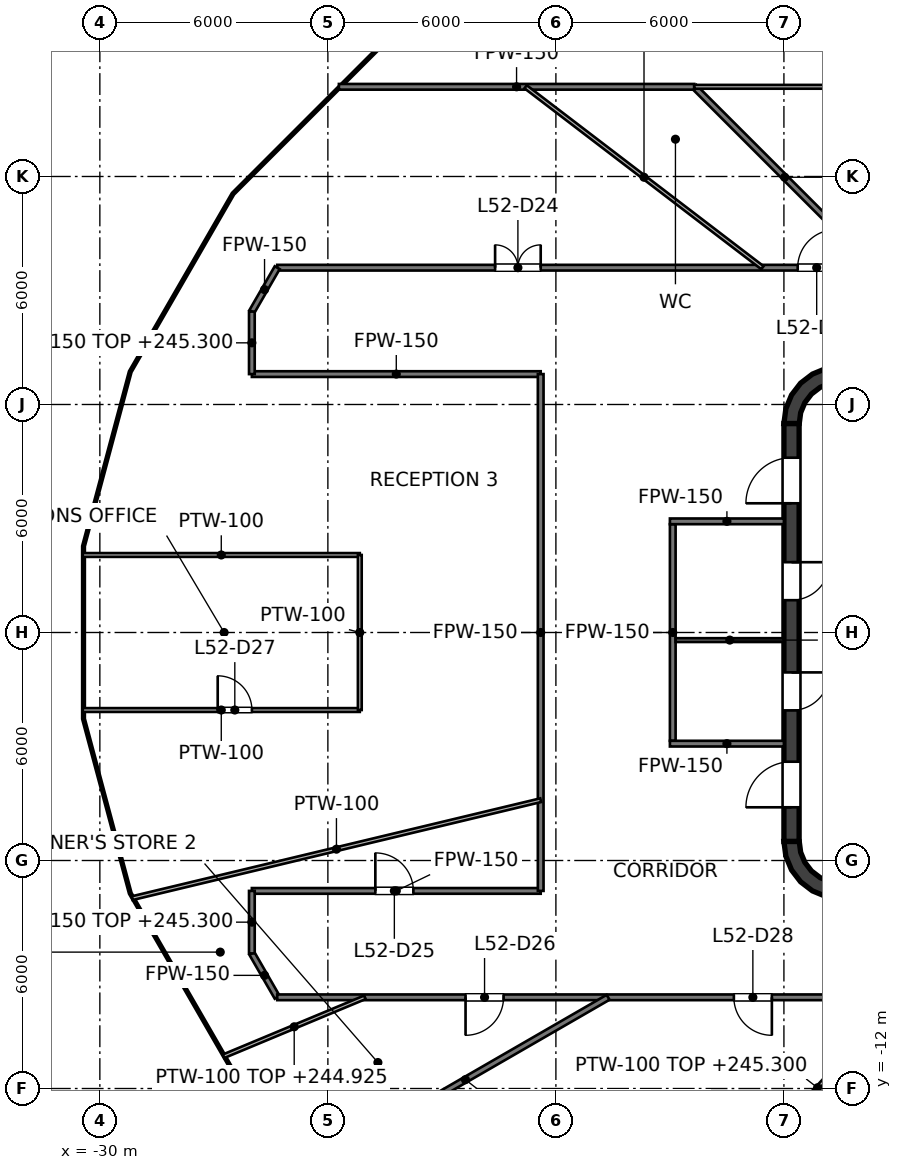
"""IFC4 building model, lengths in metres.
Left out: names, types, materials, properties, quantities, classifications, styles, units other than length and angle.
Written with IfcOpenShell. Run it as: python <this file> out.ifc"""

import sys

from ifc_helpers import new_model, si_unit, direction, frame, frame_2d, origin, place, context, subcontext, project, spatial, polyline, rectangle, outline, extrude, element, fill, save


model = new_model("IFC4")
c1 = context("Model", 3, precision=1e-05, world=origin(), true_north=direction((0.0, 1.0)))
c2 = subcontext(c1, "Body", "Model", "MODEL_VIEW")
j1 = project(units=[si_unit("LENGTHUNIT", "METRE"), si_unit("PLANEANGLEUNIT", "RADIAN")], contexts=[c1])
p1 = place(None, origin())
s1 = spatial("IfcSite", under=j1, at=p1, CompositionType="ELEMENT")
p2 = place(p1, origin())
s2 = spatial("IfcBuilding", under=s1, at=p2, CompositionType="ELEMENT")
p3 = place(p2, frame((0.0, 0.0, 241.6)))
s3 = spatial("IfcBuildingStorey", under=s2, at=p3, CompositionType="ELEMENT", Elevation=241.6)
p4 = place(p3, frame((-11.8, -5.5, 0.0), z_axis=(0.0, 0.0, 1.0), x_axis=(0.0, 1.0, 0.0)))
e1 = element("IfcWall", 1, at=p4, inside=s3, PredefinedType="SHEAR", context=c2, shape_type="SweptSolid", body=[
    extrude(rectangle(XDim=11.0, YDim=0.4, at=frame_2d((5.5, 0.0))), origin(), (0.0, 0.0, 1.0), 4.0),
])
p5 = place(p4, frame((3.45, 0.0, 0.0)))
e2 = element("IfcOpeningElement", 2, at=p5, cuts=e1, PredefinedType="OPENING", context=c2, shape_type="SweptSolid", body=[
    extrude(rectangle(XDim=1.0, YDim=2.1, at=frame_2d((0.5, 1.05))), frame((0.0, 0.2, 0.0), z_axis=(0.0, -1.0, 0.0), x_axis=(1.0, 0.0, 0.0)), (0.0, 0.0, 1.0), 0.4),
])
p6 = place(p4, frame((6.35, 0.0, 0.0)))
e3 = element("IfcOpeningElement", 3, at=p6, cuts=e1, PredefinedType="OPENING", context=c2, shape_type="SweptSolid", body=[
    extrude(rectangle(XDim=1.0, YDim=2.1, at=frame_2d((0.5, 1.05))), frame((0.0, 0.2, 0.0), z_axis=(0.0, -1.0, 0.0), x_axis=(1.0, 0.0, 0.0)), (0.0, 0.0, 1.0), 0.4),
])
p7 = place(p4, frame((0.9, 0.0, 0.0)))
e4 = element("IfcOpeningElement", 4, at=p7, cuts=e1, PredefinedType="OPENING", context=c2, shape_type="SweptSolid", body=[
    extrude(rectangle(XDim=1.2, YDim=2.1, at=frame_2d((0.6, 1.05))), frame((0.0, 0.2, 0.0), z_axis=(0.0, -1.0, 0.0), x_axis=(1.0, 0.0, 0.0)), (0.0, 0.0, 1.0), 0.4),
])
p8 = place(p4, frame((8.9, 0.0, 0.0)))
e5 = element("IfcOpeningElement", 5, at=p8, cuts=e1, PredefinedType="OPENING", context=c2, shape_type="SweptSolid", body=[
    extrude(rectangle(XDim=1.2, YDim=2.1, at=frame_2d((0.6, 1.05))), frame((0.0, 0.2, 0.0), z_axis=(0.0, -1.0, 0.0), x_axis=(1.0, 0.0, 0.0)), (0.0, 0.0, 1.0), 0.4),
])
p9 = place(p3, origin())
e6 = element("IfcWall", 6, at=p9, inside=s3, PredefinedType="SHEAR", context=c2, shape_type="SweptSolid", body=[
    extrude(outline(polyline([(-12.0, 5.5), (-11.596, 5.5), (-11.559, 5.784), (-11.45, 6.048), (-11.275, 6.275), (-11.048, 6.45), (-10.784, 6.559), (-10.5, 6.596), (-10.5, 7.0), (-10.888, 6.949), (-11.25, 6.799), (-11.561, 6.561), (-11.799, 6.25), (-11.949, 5.888), (-12.0, 5.5)])), origin(), (0.0, 0.0, 1.0), 4.0),
])
e7 = element("IfcWall", 7, at=p9, inside=s3, PredefinedType="SHEAR", context=c2, shape_type="SweptSolid", body=[
    extrude(outline(polyline([(-10.5, -7.0), (-10.5, -6.596), (-10.784, -6.559), (-11.048, -6.45), (-11.275, -6.275), (-11.45, -6.048), (-11.559, -5.784), (-11.596, -5.5), (-12.0, -5.5), (-11.949, -5.888), (-11.799, -6.25), (-11.561, -6.561), (-11.25, -6.799), (-10.888, -6.949), (-10.5, -7.0)])), origin(), (0.0, 0.0, 1.0), 4.0),
])
p10 = place(p3, frame((-14.925, -2.85, 0.0), z_axis=(0.0, 0.0, 1.0), x_axis=(0.0, 1.0, 0.0)))
e8 = element("IfcWall", 8, at=p10, inside=s3, PredefinedType="PARTITIONING", context=c2, shape_type="SweptSolid", body=[
    extrude(rectangle(XDim=5.7, YDim=0.15, at=frame_2d((2.85, 0.0))), origin(), (0.0, 0.0, 1.0), 2.768),
])
for number, where, z_axis, x_axis in (
    (9, (-15.0, 2.925, 0.0), (0.0, 0.0, 1.0), (1.0, 0.0, 0.0)),
    (10, (-15.0, -2.925, 0.0), (0.0, 0.0, 1.0), (1.0, 0.0, 0.0)),
):
    element("IfcWall", number, at=place(p3, frame(where, z_axis=z_axis, x_axis=x_axis)), inside=s3, PredefinedType="PARTITIONING", context=c2, shape_type="SweptSolid", body=[
        extrude(rectangle(XDim=3.0, YDim=0.15, at=frame_2d((1.5, 0.0))), origin(), (0.0, 0.0, 1.0), 2.768),
    ])
p11 = place(p3, frame((-14.85, -0.2, 0.0), z_axis=(0.0, 0.0, 1.0), x_axis=(1.0, 0.0, 0.0)))
e11 = element("IfcWall", 11, at=p11, inside=s3, PredefinedType="PARTITIONING", context=c2, shape_type="SweptSolid", body=[
    extrude(rectangle(XDim=2.85, YDim=0.1, at=frame_2d((1.425, 0.0))), origin(), (0.0, 0.0, 1.0), 2.768),
])
p12 = place(p3, frame((-26.0, -8.445, 0.0), z_axis=(0.0, 0.0, 1.0), x_axis=(0.500076310463, -0.865981341435, 0.0)))
e12 = element("IfcWall", 12, at=p12, inside=s3, PredefinedType="PARTITIONING", context=c2, shape_type="SweptSolid", body=[
    extrude(rectangle(XDim=1.334, YDim=0.15, at=frame_2d((0.667, 0.0))), origin(), (0.0, 0.0, 1.0), 2.768),
])
p13 = place(p3, frame((-14.36, 14.36, 0.0), z_axis=(0.0, 0.0, 1.0), x_axis=(0.707106781187, -0.707106781187, 0.0)))
e13 = element("IfcWall", 13, at=p13, inside=s3, PredefinedType="PARTITIONING", context=c2, shape_type="SweptSolid", body=[
    extrude(rectangle(XDim=6.732, YDim=0.15, at=frame_2d((3.366, 0.0))), origin(), (0.0, 0.0, 1.0), 2.768),
])
p14 = place(p3, frame((-25.333, -9.6, 0.0), z_axis=(0.0, 0.0, 1.0), x_axis=(1.0, 0.0, 0.0)))
e14 = element("IfcWall", 14, at=p14, inside=s3, PredefinedType="PARTITIONING", context=c2, shape_type="SweptSolid", body=[
    extrude(rectangle(XDim=50.666, YDim=0.15, at=frame_2d((25.333, 0.0))), origin(), (0.0, 0.0, 1.0), 2.768),
])
p15 = place(p14, frame((4.956, 0.0, 0.0)))
e15 = element("IfcOpeningElement", 15, at=p15, cuts=e14, PredefinedType="OPENING", context=c2, shape_type="SweptSolid", body=[
    extrude(rectangle(XDim=1.0, YDim=2.1, at=frame_2d((0.5, 1.05))), frame((0.0, 0.075, 0.0), z_axis=(0.0, -1.0, 0.0), x_axis=(1.0, 0.0, 0.0)), (0.0, 0.0, 1.0), 0.15),
])
p16 = place(p14, frame((12.016, 0.0, 0.0)))
e16 = element("IfcOpeningElement", 16, at=p16, cuts=e14, PredefinedType="OPENING", context=c2, shape_type="SweptSolid", body=[
    extrude(rectangle(XDim=1.0, YDim=2.1, at=frame_2d((0.5, 1.05))), frame((0.0, 0.075, 0.0), z_axis=(0.0, -1.0, 0.0), x_axis=(1.0, 0.0, 0.0)), (0.0, 0.0, 1.0), 0.15),
])
p17 = place(p14, frame((18.068, 0.0, 0.0)))
e17 = element("IfcOpeningElement", 17, at=p17, cuts=e14, PredefinedType="OPENING", context=c2, shape_type="SweptSolid", body=[
    extrude(rectangle(XDim=1.0, YDim=2.1, at=frame_2d((0.5, 1.05))), frame((0.0, 0.075, 0.0), z_axis=(0.0, -1.0, 0.0), x_axis=(1.0, 0.0, 0.0)), (0.0, 0.0, 1.0), 0.15),
])
p18 = place(p14, frame((22.521, 0.0, 0.0)))
e18 = element("IfcOpeningElement", 18, at=p18, cuts=e14, PredefinedType="OPENING", context=c2, shape_type="SweptSolid", body=[
    extrude(rectangle(XDim=1.0, YDim=2.1, at=frame_2d((0.5, 1.05))), frame((0.0, 0.075, 0.0), z_axis=(0.0, -1.0, 0.0), x_axis=(1.0, 0.0, 0.0)), (0.0, 0.0, 1.0), 0.15),
])
p19 = place(p14, frame((26.665, 0.0, 0.0)))
e19 = element("IfcOpeningElement", 19, at=p19, cuts=e14, PredefinedType="OPENING", context=c2, shape_type="SweptSolid", body=[
    extrude(rectangle(XDim=1.0, YDim=2.1, at=frame_2d((0.5, 1.05))), frame((0.0, 0.075, 0.0), z_axis=(0.0, -1.0, 0.0), x_axis=(1.0, 0.0, 0.0)), (0.0, 0.0, 1.0), 0.15),
])
p20 = place(p14, frame((31.12, 0.0, 0.0)))
e20 = element("IfcOpeningElement", 20, at=p20, cuts=e14, PredefinedType="OPENING", context=c2, shape_type="SweptSolid", body=[
    extrude(rectangle(XDim=1.0, YDim=2.1, at=frame_2d((0.5, 1.05))), frame((0.0, 0.075, 0.0), z_axis=(0.0, -1.0, 0.0), x_axis=(1.0, 0.0, 0.0)), (0.0, 0.0, 1.0), 0.15),
])
p21 = place(p14, frame((41.953, 0.0, 0.0)))
e21 = element("IfcOpeningElement", 21, at=p21, cuts=e14, PredefinedType="OPENING", context=c2, shape_type="SweptSolid", body=[
    extrude(rectangle(XDim=1.0, YDim=2.1, at=frame_2d((0.5, 1.05))), frame((0.0, 0.075, 0.0), z_axis=(0.0, -1.0, 0.0), x_axis=(1.0, 0.0, 0.0)), (0.0, 0.0, 1.0), 0.15),
])
p22 = place(p3, frame((-26.0, -6.8, 0.0), z_axis=(0.0, 0.0, 1.0), x_axis=(1.0, 0.0, 0.0)))
e22 = element("IfcWall", 22, at=p22, inside=s3, PredefinedType="PARTITIONING", context=c2, shape_type="SweptSolid", body=[
    extrude(rectangle(XDim=7.6, YDim=0.15, at=frame_2d((3.8, 0.0))), origin(), (0.0, 0.0, 1.0), 2.768),
])
p23 = place(p22, frame((3.249, 0.0, 0.0)))
e23 = element("IfcOpeningElement", 23, at=p23, cuts=e22, PredefinedType="OPENING", context=c2, shape_type="SweptSolid", body=[
    extrude(rectangle(XDim=1.0, YDim=2.1, at=frame_2d((0.5, 1.05))), frame((0.0, 0.075, 0.0), z_axis=(0.0, -1.0, 0.0), x_axis=(1.0, 0.0, 0.0)), (0.0, 0.0, 1.0), 0.15),
])
p24 = place(p3, frame((-26.0, 6.8, 0.0), z_axis=(0.0, 0.0, 1.0), x_axis=(1.0, 0.0, 0.0)))
e24 = element("IfcWall", 24, at=p24, inside=s3, PredefinedType="PARTITIONING", context=c2, shape_type="SweptSolid", body=[
    extrude(rectangle(XDim=7.6, YDim=0.15, at=frame_2d((3.8, 0.0))), origin(), (0.0, 0.0, 1.0), 2.768),
])
p25 = place(p3, frame((-25.333, 9.6, 0.0), z_axis=(0.0, 0.0, 1.0), x_axis=(1.0, 0.0, 0.0)))
e25 = element("IfcWall", 25, at=p25, inside=s3, PredefinedType="PARTITIONING", context=c2, shape_type="SweptSolid", body=[
    extrude(rectangle(XDim=50.666, YDim=0.15, at=frame_2d((25.333, 0.0))), origin(), (0.0, 0.0, 1.0), 2.768),
])
p26 = place(p25, frame((40.221, 0.0, 0.0)))
e26 = element("IfcOpeningElement", 26, at=p26, cuts=e25, PredefinedType="OPENING", context=c2, shape_type="SweptSolid", body=[
    extrude(rectangle(XDim=1.2, YDim=2.1, at=frame_2d((0.6, 1.05))), frame((0.0, 0.075, 0.0), z_axis=(0.0, -1.0, 0.0), x_axis=(1.0, 0.0, 0.0)), (0.0, 0.0, 1.0), 0.15),
])
p27 = place(p25, frame((28.328, 0.0, 0.0)))
e27 = element("IfcOpeningElement", 27, at=p27, cuts=e25, PredefinedType="OPENING", context=c2, shape_type="SweptSolid", body=[
    extrude(rectangle(XDim=1.0, YDim=2.1, at=frame_2d((0.5, 1.05))), frame((0.0, 0.075, 0.0), z_axis=(0.0, -1.0, 0.0), x_axis=(1.0, 0.0, 0.0)), (0.0, 0.0, 1.0), 0.15),
])
p28 = place(p25, frame((24.461, 0.0, 0.0)))
e28 = element("IfcOpeningElement", 28, at=p28, cuts=e25, PredefinedType="OPENING", context=c2, shape_type="SweptSolid", body=[
    extrude(rectangle(XDim=1.0, YDim=2.1, at=frame_2d((0.5, 1.05))), frame((0.0, 0.075, 0.0), z_axis=(0.0, -1.0, 0.0), x_axis=(1.0, 0.0, 0.0)), (0.0, 0.0, 1.0), 0.15),
])
p29 = place(p25, frame((18.938, 0.0, 0.0)))
e29 = element("IfcOpeningElement", 29, at=p29, cuts=e25, PredefinedType="OPENING", context=c2, shape_type="SweptSolid", body=[
    extrude(rectangle(XDim=1.0, YDim=2.1, at=frame_2d((0.5, 1.05))), frame((0.0, 0.075, 0.0), z_axis=(0.0, -1.0, 0.0), x_axis=(1.0, 0.0, 0.0)), (0.0, 0.0, 1.0), 0.15),
])
p30 = place(p25, frame((13.695, 0.0, 0.0)))
e30 = element("IfcOpeningElement", 30, at=p30, cuts=e25, PredefinedType="OPENING", context=c2, shape_type="SweptSolid", body=[
    extrude(rectangle(XDim=1.0, YDim=2.1, at=frame_2d((0.5, 1.05))), frame((0.0, 0.075, 0.0), z_axis=(0.0, -1.0, 0.0), x_axis=(1.0, 0.0, 0.0)), (0.0, 0.0, 1.0), 0.15),
])
p31 = place(p25, frame((5.733, 0.0, 0.0)))
e31 = element("IfcOpeningElement", 31, at=p31, cuts=e25, PredefinedType="OPENING", context=c2, shape_type="SweptSolid", body=[
    extrude(rectangle(XDim=1.2, YDim=2.1, at=frame_2d((0.6, 1.05))), frame((0.0, 0.075, 0.0), z_axis=(0.0, -1.0, 0.0), x_axis=(1.0, 0.0, 0.0)), (0.0, 0.0, 1.0), 0.15),
])
p32 = place(p3, frame((-23.71, 14.36, 0.0), z_axis=(0.0, 0.0, 1.0), x_axis=(1.0, 0.0, 0.0)))
e32 = element("IfcWall", 32, at=p32, inside=s3, PredefinedType="PARTITIONING", context=c2, shape_type="SweptSolid", body=[
    extrude(rectangle(XDim=9.35, YDim=0.15, at=frame_2d((4.675, 0.0))), origin(), (0.0, 0.0, 1.0), 2.768),
])
p33 = place(p3, frame((-24.135, -13.935, 0.0), z_axis=(0.0, 0.0, 1.0), x_axis=(0.866016292776, 0.500015780397, 0.0)))
e33 = element("IfcWall", 33, at=p33, inside=s3, PredefinedType="PARTITIONING", context=c2, shape_type="SweptSolid", body=[
    extrude(rectangle(XDim=8.67, YDim=0.15, at=frame_2d((4.335, 0.0))), origin(), (0.0, 0.0, 1.0), 2.777),
])
p34 = place(p3, frame((-26.0, 8.445, 0.0), z_axis=(0.0, 0.0, 1.0), x_axis=(0.500076310463, 0.865981341435, 0.0)))
e34 = element("IfcWall", 34, at=p34, inside=s3, PredefinedType="PARTITIONING", context=c2, shape_type="SweptSolid", body=[
    extrude(rectangle(XDim=1.334, YDim=0.15, at=frame_2d((0.667, 0.0))), origin(), (0.0, 0.0, 1.0), 2.768),
])
p35 = place(p3, frame((-18.4, -6.8, 0.0), z_axis=(0.0, 0.0, 1.0), x_axis=(0.0, 1.0, 0.0)))
e35 = element("IfcWall", 35, at=p35, inside=s3, PredefinedType="PARTITIONING", context=c2, shape_type="SweptSolid", body=[
    extrude(rectangle(XDim=13.6, YDim=0.15, at=frame_2d((6.8, 0.0))), origin(), (0.0, 0.0, 1.0), 2.768),
])
for number, where, z_axis, x_axis in (
    (36, (-26.0, -8.445, 0.0), (0.0, 0.0, 1.0), (0.0, 1.0, 0.0)),
    (37, (-26.0, 6.8, 0.0), (0.0, 0.0, 1.0), (0.0, 1.0, 0.0)),
):
    element("IfcWall", number, at=place(p3, frame(where, z_axis=z_axis, x_axis=x_axis)), inside=s3, PredefinedType="PARTITIONING", context=c2, shape_type="SweptSolid", body=[
        extrude(rectangle(XDim=1.645, YDim=0.15, at=frame_2d((0.823, 0.0))), origin(), (0.0, 0.0, 1.0), 3.7),
    ])
p36 = place(p3, frame((-18.797, 14.36, 0.0), z_axis=(0.0, 0.0, 1.0), x_axis=(0.794667043869, -0.607045541445, 0.0)))
e38 = element("IfcWall", 38, at=p36, inside=s3, PredefinedType="PARTITIONING", context=c2, shape_type="SweptSolid", body=[
    extrude(rectangle(XDim=7.841, YDim=0.1, at=frame_2d((3.921, 0.0))), origin(), (0.0, 0.0, 1.0), 3.7),
])
p37 = place(p3, frame((-30.45, -2.04, 0.0), z_axis=(0.0, 0.0, 1.0), x_axis=(1.0, 0.0, 0.0)))
e39 = element("IfcWall", 39, at=p37, inside=s3, PredefinedType="PARTITIONING", context=c2, shape_type="SweptSolid", body=[
    extrude(rectangle(XDim=7.29, YDim=0.1, at=frame_2d((3.645, 0.0))), origin(), (0.0, 0.0, 1.0), 2.768),
])
p38 = place(p37, frame((3.551, 0.0, 0.0)))
e40 = element("IfcOpeningElement", 40, at=p38, cuts=e39, PredefinedType="OPENING", context=c2, shape_type="SweptSolid", body=[
    extrude(rectangle(XDim=0.9, YDim=2.1, at=frame_2d((0.45, 1.05))), frame((0.0, 0.05, 0.0), z_axis=(0.0, -1.0, 0.0), x_axis=(1.0, 0.0, 0.0)), (0.0, 0.0, 1.0), 0.1),
])
p39 = place(p3, frame((-30.45, 2.04, 0.0), z_axis=(0.0, 0.0, 1.0), x_axis=(1.0, 0.0, 0.0)))
e41 = element("IfcWall", 41, at=p39, inside=s3, PredefinedType="PARTITIONING", context=c2, shape_type="SweptSolid", body=[
    extrude(rectangle(XDim=7.29, YDim=0.1, at=frame_2d((3.645, 0.0))), origin(), (0.0, 0.0, 1.0), 2.768),
])
p40 = place(p3, frame((-14.36, 14.36, 0.0), z_axis=(0.0, 0.0, 1.0), x_axis=(1.0, 0.0, 0.0)))
e42 = element("IfcWall", 42, at=p40, inside=s3, PredefinedType="PARTITIONING", context=c2, shape_type="SweptSolid", body=[
    extrude(rectangle(XDim=22.651, YDim=0.1, at=frame_2d((11.326, 0.0))), origin(), (0.0, 0.0, 1.0), 2.768),
])
p41 = place(p40, frame((4.642, 0.0, 0.0)))
e43 = element("IfcOpeningElement", 43, at=p41, cuts=e42, PredefinedType="OPENING", context=c2, shape_type="SweptSolid", body=[
    extrude(rectangle(XDim=1.8, YDim=2.1, at=frame_2d((0.9, 1.05))), frame((0.0, 0.05, 0.0), z_axis=(0.0, -1.0, 0.0), x_axis=(1.0, 0.0, 0.0)), (0.0, 0.0, 1.0), 0.1),
])
p42 = place(p3, frame((-29.149, -6.991, 0.0), z_axis=(0.0, 0.0, 1.0), x_axis=(0.97242598182, 0.233211727583, 0.0)))
e44 = element("IfcWall", 44, at=p42, inside=s3, PredefinedType="PARTITIONING", context=c2, shape_type="SweptSolid", body=[
    extrude(rectangle(XDim=11.054, YDim=0.1, at=frame_2d((5.527, 0.0))), origin(), (0.0, 0.0, 1.0), 2.768),
])
p43 = place(p3, frame((-26.747, -11.152, 0.0), z_axis=(0.0, 0.0, 1.0), x_axis=(0.922980174508, 0.384847498973, 0.0)))
e45 = element("IfcWall", 45, at=p43, inside=s3, PredefinedType="PARTITIONING", context=c2, shape_type="SweptSolid", body=[
    extrude(rectangle(XDim=4.033, YDim=0.1, at=frame_2d((2.016, 0.0))), origin(), (0.0, 0.0, 1.0), 3.325),
])
p44 = place(p3, frame((-13.324, -14.36, 0.0), z_axis=(0.0, 0.0, 1.0), x_axis=(0.680201581888, 0.733025107344, 0.0)))
e46 = element("IfcWall", 46, at=p44, inside=s3, PredefinedType="PARTITIONING", context=c2, shape_type="SweptSolid", body=[
    extrude(rectangle(XDim=6.494, YDim=0.1, at=frame_2d((3.247, 0.0))), origin(), (0.0, 0.0, 1.0), 3.7),
])
p45 = place(p3, frame((-23.16, -2.04, 0.0), z_axis=(0.0, 0.0, 1.0), x_axis=(0.0, 1.0, 0.0)))
e47 = element("IfcWall", 47, at=p45, inside=s3, PredefinedType="PARTITIONING", context=c2, shape_type="SweptSolid", body=[
    extrude(rectangle(XDim=4.08, YDim=0.1, at=frame_2d((2.04, 0.0))), origin(), (0.0, 0.0, 1.0), 2.768),
])
p46 = place(p5, origin())
e48 = element("IfcDoor", 48, at=p46, inside=s3, OperationType="SINGLE_SWING_RIGHT", PredefinedType="DOOR", context=c2, shape_type="SweptSolid", body=[
    extrude(rectangle(XDim=1.0, YDim=2.1, at=frame_2d((0.5, 1.05))), frame((0.0, 0.025, 0.0), z_axis=(0.0, -1.0, 0.0), x_axis=(1.0, 0.0, 0.0)), (0.0, 0.0, 1.0), 0.05),
])
fill(e2, e48)
p47 = place(p6, origin())
e49 = element("IfcDoor", 49, at=p47, inside=s3, OperationType="SINGLE_SWING_RIGHT", PredefinedType="DOOR", context=c2, shape_type="SweptSolid", body=[
    extrude(rectangle(XDim=1.0, YDim=2.1, at=frame_2d((0.5, 1.05))), frame((0.0, 0.025, 0.0), z_axis=(0.0, -1.0, 0.0), x_axis=(1.0, 0.0, 0.0)), (0.0, 0.0, 1.0), 0.05),
])
fill(e3, e49)
p48 = place(p7, origin())
e50 = element("IfcDoor", 50, at=p48, inside=s3, OperationType="SINGLE_SWING_LEFT", PredefinedType="DOOR", context=c2, shape_type="SweptSolid", body=[
    extrude(rectangle(XDim=1.2, YDim=2.1, at=frame_2d((0.6, 1.05))), frame((0.0, 0.025, 0.0), z_axis=(0.0, -1.0, 0.0), x_axis=(1.0, 0.0, 0.0)), (0.0, 0.0, 1.0), 0.05),
])
fill(e4, e50)
p49 = place(p8, origin())
e51 = element("IfcDoor", 51, at=p49, inside=s3, OperationType="SINGLE_SWING_LEFT", PredefinedType="DOOR", context=c2, shape_type="SweptSolid", body=[
    extrude(rectangle(XDim=1.2, YDim=2.1, at=frame_2d((0.6, 1.05))), frame((0.0, 0.025, 0.0), z_axis=(0.0, -1.0, 0.0), x_axis=(1.0, 0.0, 0.0)), (0.0, 0.0, 1.0), 0.05),
])
fill(e5, e51)
p50 = place(p30, origin())
e52 = element("IfcDoor", 52, at=p50, inside=s3, OperationType="SINGLE_SWING_RIGHT", PredefinedType="DOOR", context=c2, shape_type="SweptSolid", body=[
    extrude(rectangle(XDim=1.0, YDim=2.1, at=frame_2d((0.5, 1.05))), frame((0.0, 0.025, 0.0), z_axis=(0.0, -1.0, 0.0), x_axis=(1.0, 0.0, 0.0)), (0.0, 0.0, 1.0), 0.05),
])
fill(e30, e52)
p51 = place(p31, origin())
e53 = element("IfcDoor", 53, at=p51, inside=s3, OperationType="DOUBLE_DOOR_SINGLE_SWING", PredefinedType="DOOR", context=c2, shape_type="SweptSolid", body=[
    extrude(rectangle(XDim=1.2, YDim=2.1, at=frame_2d((0.6, 1.05))), frame((0.0, 0.025, 0.0), z_axis=(0.0, -1.0, 0.0), x_axis=(1.0, 0.0, 0.0)), (0.0, 0.0, 1.0), 0.05),
])
fill(e31, e53)
p52 = place(p23, origin())
e54 = element("IfcDoor", 54, at=p52, inside=s3, OperationType="SINGLE_SWING_LEFT", PredefinedType="DOOR", context=c2, shape_type="SweptSolid", body=[
    extrude(rectangle(XDim=1.0, YDim=2.1, at=frame_2d((0.5, 1.05))), frame((0.0, 0.025, 0.0), z_axis=(0.0, -1.0, 0.0), x_axis=(1.0, 0.0, 0.0)), (0.0, 0.0, 1.0), 0.05),
])
fill(e23, e54)
p53 = place(p15, origin())
e55 = element("IfcDoor", 55, at=p53, inside=s3, OperationType="SINGLE_SWING_LEFT", PredefinedType="DOOR", context=c2, shape_type="SweptSolid", body=[
    extrude(rectangle(XDim=1.0, YDim=2.1, at=frame_2d((0.5, 1.05))), frame((0.0, 0.025, 0.0), z_axis=(0.0, -1.0, 0.0), x_axis=(1.0, 0.0, 0.0)), (0.0, 0.0, 1.0), 0.05),
])
fill(e15, e55)
p54 = place(p38, origin())
e56 = element("IfcDoor", 56, at=p54, inside=s3, OperationType="SINGLE_SWING_LEFT", PredefinedType="DOOR", context=c2, shape_type="SweptSolid", body=[
    extrude(rectangle(XDim=0.9, YDim=2.1, at=frame_2d((0.45, 1.05))), frame((0.0, 0.025, 0.0), z_axis=(0.0, -1.0, 0.0), x_axis=(1.0, 0.0, 0.0)), (0.0, 0.0, 1.0), 0.05),
])
fill(e40, e56)
p55 = place(p16, origin())
e57 = element("IfcDoor", 57, at=p55, inside=s3, OperationType="SINGLE_SWING_RIGHT", PredefinedType="DOOR", context=c2, shape_type="SweptSolid", body=[
    extrude(rectangle(XDim=1.0, YDim=2.1, at=frame_2d((0.5, 1.05))), frame((0.0, 0.025, 0.0), z_axis=(0.0, -1.0, 0.0), x_axis=(1.0, 0.0, 0.0)), (0.0, 0.0, 1.0), 0.05),
])
fill(e16, e57)
save(model, sys.argv[1])
